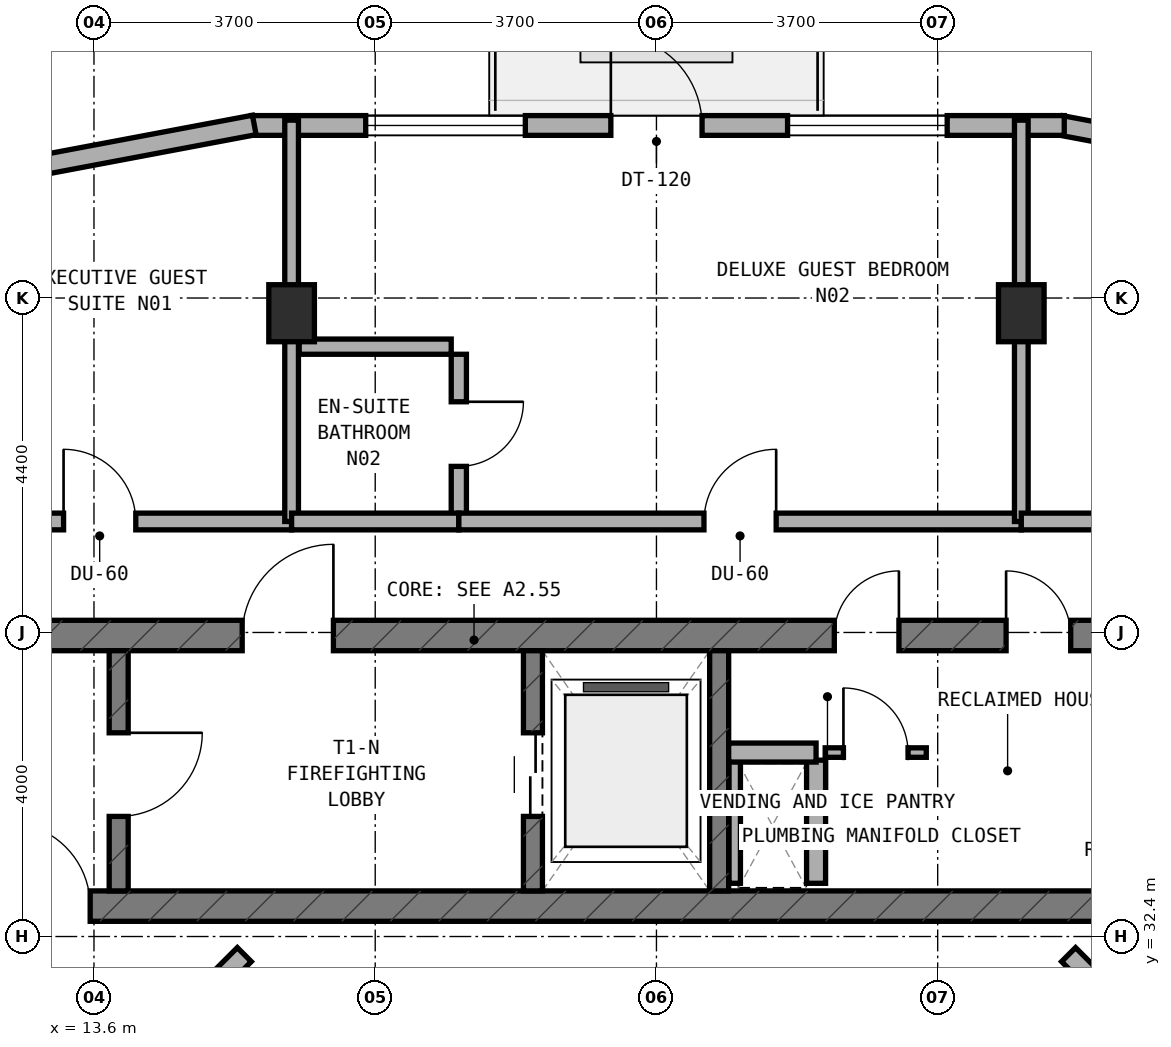
"""IFC4 building model, lengths in metres.
Left out: names, types, materials, properties, quantities, classifications, styles, units other than length and angle.
Written with IfcOpenShell. Run it as: python <this file> out.ifc"""

import sys

from ifc_helpers import new_model, si_unit, direction, frame, frame_2d, origin, origin_2d, place, context, subcontext, project, spatial, rectangle, extrude, element, fill, save


model = new_model("IFC4")
c1 = context("Model", 3, precision=1e-05, world=origin(), true_north=direction((0.0, 1.0)))
c2 = subcontext(c1, "Body", "Model", "MODEL_VIEW")
j1 = project(units=[si_unit("LENGTHUNIT", "METRE"), si_unit("PLANEANGLEUNIT", "RADIAN")], contexts=[c1])
p1 = place(None, origin())
s1 = spatial("IfcSite", under=j1, at=p1, CompositionType="ELEMENT")
p2 = place(p1, origin())
s2 = spatial("IfcBuilding", under=s1, at=p2, CompositionType="ELEMENT")
p3 = place(p2, frame((0.0, 0.0, 254.0)))
s3 = spatial("IfcBuildingStorey", under=s2, at=p3, CompositionType="ELEMENT", Elevation=254.0)
p4 = place(p3, frame((6.4, 32.8, 0.0), z_axis=(0.0, 0.0, 1.0), x_axis=(1.0, 0.0, 0.0)))
e1 = element("IfcWall", 1, at=p4, inside=s3, PredefinedType="SHEAR", context=c2, shape_type="SweptSolid", body=[
    extrude(rectangle(XDim=24.4, YDim=0.4, at=frame_2d((12.2, 0.0))), origin(), (0.0, 0.0, 1.0), 3.6),
])
p5 = place(p4, frame((6.05, 0.0, 0.0)))
e2 = element("IfcOpeningElement", 2, at=p5, cuts=e1, PredefinedType="OPENING", context=c2, shape_type="SweptSolid", body=[
    extrude(rectangle(XDim=1.1, YDim=2.15, at=frame_2d((0.55, 1.075))), frame((0.0, 0.21, 0.0), z_axis=(0.0, -1.0, 0.0), x_axis=(1.0, 0.0, 0.0)), (0.0, 0.0, 1.0), 0.42),
])
p6 = place(p3, frame((6.4, 36.36, 0.0), z_axis=(0.0, 0.0, 1.0), x_axis=(1.0, 0.0, 0.0)))
e3 = element("IfcWall", 3, at=p6, inside=s3, PredefinedType="SHEAR", context=c2, shape_type="SweptSolid", body=[
    extrude(rectangle(XDim=24.4, YDim=0.4, at=frame_2d((12.2, 0.0))), origin(), (0.0, 0.0, 1.0), 3.6),
])
p7 = place(p6, frame((9.15, 0.0, 0.0)))
e4 = element("IfcOpeningElement", 4, at=p7, cuts=e3, PredefinedType="OPENING", context=c2, shape_type="SweptSolid", body=[
    extrude(rectangle(XDim=1.2, YDim=2.15, at=frame_2d((0.6, 1.075))), frame((0.0, 0.21, 0.0), z_axis=(0.0, -1.0, 0.0), x_axis=(1.0, 0.0, 0.0)), (0.0, 0.0, 1.0), 0.42),
])
p8 = place(p6, frame((19.2, 0.0, 0.0)))
e5 = element("IfcOpeningElement", 5, at=p8, cuts=e3, PredefinedType="OPENING", context=c2, shape_type="SweptSolid", body=[
    extrude(rectangle(XDim=0.85, YDim=2.1, at=frame_2d((0.425, 1.05))), frame((0.0, 0.21, 0.0), z_axis=(0.0, -1.0, 0.0), x_axis=(1.0, 0.0, 0.0)), (0.0, 0.0, 1.0), 0.42),
])
p9 = place(p6, frame((16.94, 0.0, 0.0)))
e6 = element("IfcOpeningElement", 6, at=p9, cuts=e3, PredefinedType="OPENING", context=c2, shape_type="SweptSolid", body=[
    extrude(rectangle(XDim=0.85, YDim=2.1, at=frame_2d((0.425, 1.05))), frame((0.0, 0.21, 0.0), z_axis=(0.0, -1.0, 0.0), x_axis=(1.0, 0.0, 0.0)), (0.0, 0.0, 1.0), 0.42),
])
p10 = place(p3, frame((13.925, 33.0, 0.0), z_axis=(0.0, 0.0, 1.0), x_axis=(0.0, 1.0, 0.0)))
e7 = element("IfcWall", 7, at=p10, inside=s3, PredefinedType="STANDARD", context=c2, shape_type="SweptSolid", body=[
    extrude(rectangle(XDim=3.16, YDim=0.25, at=frame_2d((1.58, 0.0))), origin(), (0.0, 0.0, 1.0), 3.32),
])
p11 = place(p10, frame((0.98, 0.0, 0.0)))
e8 = element("IfcOpeningElement", 8, at=p11, cuts=e7, PredefinedType="OPENING", context=c2, shape_type="SweptSolid", body=[
    extrude(rectangle(XDim=1.1, YDim=2.15, at=frame_2d((0.55, 1.075))), frame((0.0, 0.135, 0.0), z_axis=(0.0, -1.0, 0.0), x_axis=(1.0, 0.0, 0.0)), (0.0, 0.0, 1.0), 0.27),
])
p12 = place(p3, frame((19.375, 33.0, 0.0), z_axis=(0.0, 0.0, 1.0), x_axis=(0.0, 1.0, 0.0)))
e9 = element("IfcWall", 9, at=p12, inside=s3, PredefinedType="STANDARD", context=c2, shape_type="SweptSolid", body=[
    extrude(rectangle(XDim=3.16, YDim=0.25, at=frame_2d((1.58, 0.0))), origin(), (0.0, 0.0, 1.0), 3.32),
])
p13 = place(p12, frame((0.98, 0.0, 0.0)))
e10 = element("IfcOpeningElement", 10, at=p13, cuts=e9, PredefinedType="OPENING", context=c2, shape_type="SweptSolid", body=[
    extrude(rectangle(XDim=1.1, YDim=2.15, at=frame_2d((0.55, 1.075))), frame((0.0, 0.135, 0.0), z_axis=(0.0, -1.0, 0.0), x_axis=(1.0, 0.0, 0.0)), (0.0, 0.0, 1.0), 0.27),
])
p14 = place(p3, frame((21.825, 33.0, 0.0), z_axis=(0.0, 0.0, 1.0), x_axis=(0.0, 1.0, 0.0)))
e11 = element("IfcWall", 11, at=p14, inside=s3, PredefinedType="STANDARD", context=c2, shape_type="SweptSolid", body=[
    extrude(rectangle(XDim=3.16, YDim=0.25, at=frame_2d((1.58, 0.0))), origin(), (0.0, 0.0, 1.0), 3.32),
])
for number, where, z_axis, x_axis in (
    (12, (16.2, 40.6, 0.0), (0.0, 0.0, 1.0), (1.0, 0.0, 0.0)),
    (13, (25.8, 40.6, 0.0), (0.0, 0.0, 1.0), (1.0, 0.0, 0.0)),
):
    element("IfcColumn", number, at=place(p3, frame(where, z_axis=z_axis, x_axis=x_axis)), inside=s3, PredefinedType="COLUMN", context=c2, shape_type="SweptSolid", body=[
        extrude(rectangle(XDim=0.6, YDim=0.75, at=origin_2d()), origin(), (0.0, 0.0, 1.0), 3.6),
    ])
p15 = place(p3, frame((34.284, 41.571, 0.0), z_axis=(0.0, 0.0, 1.0), x_axis=(-0.982717573718, 0.185111237656, 0.0)))
e14 = element("IfcWall", 14, at=p15, inside=s3, PredefinedType="STANDARD", context=c2, shape_type="SweptSolid", body=[
    extrude(rectangle(XDim=8.098, YDim=0.26, at=frame_2d((4.049, 0.0))), origin(), (0.0, 0.0, 1.0), 3.32),
])
p16 = place(p15, frame((2.999, 0.0, 0.85)))
e15 = element("IfcOpeningElement", 15, at=p16, cuts=e14, PredefinedType="OPENING", context=c2, shape_type="SweptSolid", body=[
    extrude(rectangle(XDim=2.1, YDim=1.5, at=frame_2d((1.05, 0.75))), frame((0.0, 0.14, 0.0), z_axis=(0.0, -1.0, 0.0), x_axis=(1.0, 0.0, 0.0)), (0.0, 0.0, 1.0), 0.28),
])
p17 = place(p3, frame((26.365, 43.07, 0.0), z_axis=(0.0, 0.0, 1.0), x_axis=(-1.0, 0.0, 0.0)))
e16 = element("IfcWall", 16, at=p17, inside=s3, PredefinedType="STANDARD", context=c2, shape_type="SweptSolid", body=[
    extrude(rectangle(XDim=10.695, YDim=0.26, at=frame_2d((5.348, 0.0))), origin(), (0.0, 0.0, 1.0), 3.32),
])
p18 = place(p17, frame((4.765, 0.0, 0.0)))
e17 = element("IfcOpeningElement", 17, at=p18, cuts=e16, PredefinedType="OPENING", context=c2, shape_type="SweptSolid", body=[
    extrude(rectangle(XDim=1.2, YDim=2.15, at=frame_2d((0.6, 1.075))), frame((0.0, 0.14, 0.0), z_axis=(0.0, -1.0, 0.0), x_axis=(1.0, 0.0, 0.0)), (0.0, 0.0, 1.0), 0.28),
])
p19 = place(p17, frame((1.54, 0.0, 0.85)))
e18 = element("IfcOpeningElement", 18, at=p19, cuts=e16, PredefinedType="OPENING", context=c2, shape_type="SweptSolid", body=[
    extrude(rectangle(XDim=2.1, YDim=1.5, at=frame_2d((1.05, 0.75))), frame((0.0, 0.14, 0.0), z_axis=(0.0, -1.0, 0.0), x_axis=(1.0, 0.0, 0.0)), (0.0, 0.0, 1.0), 0.28),
])
p20 = place(p17, frame((7.09, 0.0, 0.85)))
e19 = element("IfcOpeningElement", 19, at=p20, cuts=e16, PredefinedType="OPENING", context=c2, shape_type="SweptSolid", body=[
    extrude(rectangle(XDim=2.1, YDim=1.5, at=frame_2d((1.05, 0.75))), frame((0.0, 0.14, 0.0), z_axis=(0.0, -1.0, 0.0), x_axis=(1.0, 0.0, 0.0)), (0.0, 0.0, 1.0), 0.28),
])
p21 = place(p3, frame((15.709, 43.077, 0.0), z_axis=(0.0, 0.0, 1.0), x_axis=(-0.982711765767, -0.185142068214, 0.0)))
e20 = element("IfcWall", 20, at=p21, inside=s3, PredefinedType="STANDARD", context=c2, shape_type="SweptSolid", body=[
    extrude(rectangle(XDim=8.134, YDim=0.26, at=frame_2d((4.067, 0.0))), origin(), (0.0, 0.0, 1.0), 3.32),
])
p22 = place(p21, frame((3.017, 0.0, 0.85)))
e21 = element("IfcOpeningElement", 21, at=p22, cuts=e20, PredefinedType="OPENING", context=c2, shape_type="SweptSolid", body=[
    extrude(rectangle(XDim=2.1, YDim=1.5, at=frame_2d((1.05, 0.75))), frame((0.0, 0.14, 0.0), z_axis=(0.0, -1.0, 0.0), x_axis=(1.0, 0.0, 0.0)), (0.0, 0.0, 1.0), 0.28),
])
for number, where, z_axis, x_axis in (
    (22, (28.056, 30.528, 0.0), (0.0, 0.0, 1.0), (-0.707, 0.707, 0.0)),
    (23, (15.578, 32.162, 0.0), (0.0, 0.0, 1.0), (-0.707, -0.707, 0.0)),
):
    element("IfcWall", number, at=place(p3, frame(where, z_axis=z_axis, x_axis=x_axis)), inside=s3, PredefinedType="STANDARD", context=c2, shape_type="SweptSolid", body=[
        extrude(rectangle(XDim=2.311, YDim=0.26, at=frame_2d((1.155, 0.0))), origin(), (0.0, 0.0, 1.0), 3.32),
    ])
p23 = place(p3, frame((22.03, 33.1, 0.0), z_axis=(0.0, 0.0, 1.0), x_axis=(0.0, 1.0, 0.0)))
e24 = element("IfcWall", 24, at=p23, inside=s3, PredefinedType="PARTITIONING", context=c2, shape_type="SweptSolid", body=[
    extrude(rectangle(XDim=1.62, YDim=0.15, at=frame_2d((0.81, 0.0))), origin(), (0.0, 0.0, 1.0), 3.32),
])
p24 = place(p3, frame((23.1, 33.1, 0.0), z_axis=(0.0, 0.0, 1.0), x_axis=(0.0, 1.0, 0.0)))
e25 = element("IfcWall", 25, at=p24, inside=s3, PredefinedType="SOLIDWALL", context=c2, shape_type="SweptSolid", body=[
    extrude(rectangle(XDim=1.62, YDim=0.25, at=frame_2d((0.81, 0.0))), origin(), (0.0, 0.0, 1.0), 3.32),
])
p25 = place(p3, frame((21.95, 34.82, 0.0), z_axis=(0.0, 0.0, 1.0), x_axis=(1.0, 0.0, 0.0)))
e26 = element("IfcWall", 26, at=p25, inside=s3, PredefinedType="SOLIDWALL", context=c2, shape_type="SweptSolid", body=[
    extrude(rectangle(XDim=1.15, YDim=0.25, at=frame_2d((0.575, 0.0))), origin(), (0.0, 0.0, 1.0), 3.32),
])
p26 = place(p3, frame((23.22, 34.82, 0.0), z_axis=(0.0, 0.0, 1.0), x_axis=(1.0, 0.0, 0.0)))
e27 = element("IfcWall", 27, at=p26, inside=s3, PredefinedType="PARTITIONING", context=c2, shape_type="SweptSolid", body=[
    extrude(rectangle(XDim=1.33, YDim=0.125, at=frame_2d((0.665, 0.0))), origin(), (0.0, 0.0, 1.0), 3.32),
])
p27 = place(p26, frame((0.24, 0.0, 0.0)))
e28 = element("IfcOpeningElement", 28, at=p27, cuts=e27, PredefinedType="OPENING", context=c2, shape_type="SweptSolid", body=[
    extrude(rectangle(XDim=0.85, YDim=2.1, at=frame_2d((0.425, 1.05))), frame((0.0, 0.073, 0.0), z_axis=(0.0, -1.0, 0.0), x_axis=(1.0, 0.0, 0.0)), (0.0, 0.0, 1.0), 0.145),
])
p28 = place(p3, frame((11.15, 37.86, 0.0), z_axis=(0.0, 0.0, 1.0), x_axis=(1.0, 0.0, 0.0)))
e29 = element("IfcWall", 29, at=p28, inside=s3, PredefinedType="SOLIDWALL", context=c2, shape_type="SweptSolid", body=[
    extrude(rectangle(XDim=5.05, YDim=0.22, at=frame_2d((2.525, 0.0))), origin(), (0.0, 0.0, 1.0), 2.745),
])
p29 = place(p28, frame((2.05, 0.0, 0.0)))
e30 = element("IfcOpeningElement", 30, at=p29, cuts=e29, PredefinedType="OPENING", context=c2, shape_type="SweptSolid", body=[
    extrude(rectangle(XDim=0.95, YDim=2.1, at=frame_2d((0.475, 1.05))), frame((0.0, 0.12, 0.0), z_axis=(0.0, -1.0, 0.0), x_axis=(1.0, 0.0, 0.0)), (0.0, 0.0, 1.0), 0.24),
])
p30 = place(p3, frame((16.2, 37.86, 0.0), z_axis=(0.0, 0.0, 1.0), x_axis=(0.0, 1.0, 0.0)))
e31 = element("IfcWall", 31, at=p30, inside=s3, PredefinedType="SOLIDWALL", context=c2, shape_type="SweptSolid", body=[
    extrude(rectangle(XDim=5.28, YDim=0.18, at=frame_2d((2.64, 0.0))), origin(), (0.0, 0.0, 1.0), 2.745),
])
p31 = place(p3, frame((18.4, 37.96, 0.0), z_axis=(0.0, 0.0, 1.0), x_axis=(0.0, 1.0, 0.0)))
e32 = element("IfcWall", 32, at=p31, inside=s3, PredefinedType="PLUMBINGWALL", context=c2, shape_type="SweptSolid", body=[
    extrude(rectangle(XDim=2.1, YDim=0.2, at=frame_2d((1.05, 0.0))), origin(), (0.0, 0.0, 1.0), 2.845),
])
p32 = place(p31, frame((0.625, 0.0, 0.0)))
e33 = element("IfcOpeningElement", 33, at=p32, cuts=e32, PredefinedType="OPENING", context=c2, shape_type="SweptSolid", body=[
    extrude(rectangle(XDim=0.85, YDim=2.1, at=frame_2d((0.425, 1.05))), frame((0.0, 0.11, 0.0), z_axis=(0.0, -1.0, 0.0), x_axis=(1.0, 0.0, 0.0)), (0.0, 0.0, 1.0), 0.22),
])
p33 = place(p3, frame((16.3, 40.16, 0.0), z_axis=(0.0, 0.0, 1.0), x_axis=(1.0, 0.0, 0.0)))
e34 = element("IfcWall", 34, at=p33, inside=s3, PredefinedType="PLUMBINGWALL", context=c2, shape_type="SweptSolid", body=[
    extrude(rectangle(XDim=2.0, YDim=0.2, at=frame_2d((1.0, 0.0))), origin(), (0.0, 0.0, 1.0), 3.32),
])
p34 = place(p3, frame((16.2, 37.86, 0.0), z_axis=(0.0, 0.0, 1.0), x_axis=(1.0, 0.0, 0.0)))
e35 = element("IfcWall", 35, at=p34, inside=s3, PredefinedType="SOLIDWALL", context=c2, shape_type="SweptSolid", body=[
    extrude(rectangle(XDim=2.2, YDim=0.22, at=frame_2d((1.1, 0.0))), origin(), (0.0, 0.0, 1.0), 2.745),
])
p35 = place(p3, frame((18.4, 37.86, 0.0), z_axis=(0.0, 0.0, 1.0), x_axis=(1.0, 0.0, 0.0)))
e36 = element("IfcWall", 36, at=p35, inside=s3, PredefinedType="SOLIDWALL", context=c2, shape_type="SweptSolid", body=[
    extrude(rectangle(XDim=7.4, YDim=0.22, at=frame_2d((3.7, 0.0))), origin(), (0.0, 0.0, 1.0), 2.745),
])
p36 = place(p35, frame((3.225, 0.0, 0.0)))
e37 = element("IfcOpeningElement", 37, at=p36, cuts=e36, PredefinedType="OPENING", context=c2, shape_type="SweptSolid", body=[
    extrude(rectangle(XDim=0.95, YDim=2.1, at=frame_2d((0.475, 1.05))), frame((0.0, 0.12, 0.0), z_axis=(0.0, -1.0, 0.0), x_axis=(1.0, 0.0, 0.0)), (0.0, 0.0, 1.0), 0.24),
])
p37 = place(p3, frame((25.8, 37.86, 0.0), z_axis=(0.0, 0.0, 1.0), x_axis=(0.0, 1.0, 0.0)))
e38 = element("IfcWall", 38, at=p37, inside=s3, PredefinedType="SOLIDWALL", context=c2, shape_type="SweptSolid", body=[
    extrude(rectangle(XDim=5.28, YDim=0.18, at=frame_2d((2.64, 0.0))), origin(), (0.0, 0.0, 1.0), 2.745),
])
p38 = place(p3, frame((25.8, 37.86, 0.0), z_axis=(0.0, 0.0, 1.0), x_axis=(1.0, 0.0, 0.0)))
e39 = element("IfcWall", 39, at=p38, inside=s3, PredefinedType="SOLIDWALL", context=c2, shape_type="SweptSolid", body=[
    extrude(rectangle(XDim=5.05, YDim=0.22, at=frame_2d((2.525, 0.0))), origin(), (0.0, 0.0, 1.0), 2.745),
])
p39 = place(p38, frame((2.05, 0.0, 0.0)))
e40 = element("IfcOpeningElement", 40, at=p39, cuts=e39, PredefinedType="OPENING", context=c2, shape_type="SweptSolid", body=[
    extrude(rectangle(XDim=0.95, YDim=2.1, at=frame_2d((0.475, 1.05))), frame((0.0, 0.12, 0.0), z_axis=(0.0, -1.0, 0.0), x_axis=(1.0, 0.0, 0.0)), (0.0, 0.0, 1.0), 0.24),
])
p40 = place(p18, frame((1.2, 0.0, 0.0), z_axis=(0.0, 0.0, 1.0), x_axis=(-1.0, 0.0, 0.0)))
e41 = element("IfcDoor", 41, at=p40, inside=s3, OperationType="SINGLE_SWING_LEFT", PredefinedType="DOOR", context=c2, shape_type="SweptSolid", body=[
    extrude(rectangle(XDim=1.2, YDim=2.15, at=frame_2d((0.6, 1.075))), frame((0.0, 0.025, 0.0), z_axis=(0.0, -1.0, 0.0), x_axis=(1.0, 0.0, 0.0)), (0.0, 0.0, 1.0), 0.05),
])
fill(e17, e41)
p41 = place(p19, origin())
e42 = element("IfcWindow", 42, at=p41, inside=s3, PartitioningType="SINGLE_PANEL", PredefinedType="WINDOW", context=c2, shape_type="SweptSolid", body=[
    extrude(rectangle(XDim=2.1, YDim=1.5, at=frame_2d((1.05, 0.75))), frame((0.0, 0.03, 0.0), z_axis=(0.0, -1.0, 0.0), x_axis=(1.0, 0.0, 0.0)), (0.0, 0.0, 1.0), 0.06),
])
fill(e18, e42)
p42 = place(p20, origin())
e43 = element("IfcWindow", 43, at=p42, inside=s3, PartitioningType="SINGLE_PANEL", PredefinedType="WINDOW", context=c2, shape_type="SweptSolid", body=[
    extrude(rectangle(XDim=2.1, YDim=1.5, at=frame_2d((1.05, 0.75))), frame((0.0, 0.03, 0.0), z_axis=(0.0, -1.0, 0.0), x_axis=(1.0, 0.0, 0.0)), (0.0, 0.0, 1.0), 0.06),
])
fill(e19, e43)
p43 = place(p11, frame((1.1, 0.0, 0.0), z_axis=(0.0, 0.0, 1.0), x_axis=(-1.0, 0.0, 0.0)))
e44 = element("IfcDoor", 44, at=p43, inside=s3, OperationType="SINGLE_SWING_LEFT", PredefinedType="DOOR", context=c2, shape_type="SweptSolid", body=[
    extrude(rectangle(XDim=1.1, YDim=2.15, at=frame_2d((0.55, 1.075))), frame((0.0, 0.025, 0.0), z_axis=(0.0, -1.0, 0.0), x_axis=(1.0, 0.0, 0.0)), (0.0, 0.0, 1.0), 0.05),
])
fill(e8, e44)
p44 = place(p7, origin())
e45 = element("IfcDoor", 45, at=p44, inside=s3, OperationType="SINGLE_SWING_RIGHT", PredefinedType="DOOR", context=c2, shape_type="SweptSolid", body=[
    extrude(rectangle(XDim=1.2, YDim=2.15, at=frame_2d((0.6, 1.075))), frame((0.0, 0.025, 0.0), z_axis=(0.0, -1.0, 0.0), x_axis=(1.0, 0.0, 0.0)), (0.0, 0.0, 1.0), 0.05),
])
fill(e4, e45)
p45 = place(p13, origin())
e46 = element("IfcDoor", 46, at=p45, inside=s3, OperationType="DOUBLE_DOOR_SLIDING", PredefinedType="DOOR", context=c2, shape_type="SweptSolid", body=[
    extrude(rectangle(XDim=1.1, YDim=2.15, at=frame_2d((0.55, 1.075))), frame((0.0, 0.025, 0.0), z_axis=(0.0, -1.0, 0.0), x_axis=(1.0, 0.0, 0.0)), (0.0, 0.0, 1.0), 0.05),
])
fill(e10, e46)
p46 = place(p8, origin())
e47 = element("IfcDoor", 47, at=p46, inside=s3, OperationType="SINGLE_SWING_LEFT", PredefinedType="DOOR", context=c2, shape_type="SweptSolid", body=[
    extrude(rectangle(XDim=0.85, YDim=2.1, at=frame_2d((0.425, 1.05))), frame((0.0, 0.025, 0.0), z_axis=(0.0, -1.0, 0.0), x_axis=(1.0, 0.0, 0.0)), (0.0, 0.0, 1.0), 0.05),
])
fill(e5, e47)
p47 = place(p9, origin())
e48 = element("IfcDoor", 48, at=p47, inside=s3, OperationType="SINGLE_SWING_RIGHT", PredefinedType="DOOR", context=c2, shape_type="SweptSolid", body=[
    extrude(rectangle(XDim=0.85, YDim=2.1, at=frame_2d((0.425, 1.05))), frame((0.0, 0.025, 0.0), z_axis=(0.0, -1.0, 0.0), x_axis=(1.0, 0.0, 0.0)), (0.0, 0.0, 1.0), 0.05),
])
fill(e6, e48)
p48 = place(p5, origin())
e49 = element("IfcDoor", 49, at=p48, inside=s3, OperationType="SINGLE_SWING_LEFT", PredefinedType="DOOR", context=c2, shape_type="SweptSolid", body=[
    extrude(rectangle(XDim=1.1, YDim=2.15, at=frame_2d((0.55, 1.075))), frame((0.0, 0.025, 0.0), z_axis=(0.0, -1.0, 0.0), x_axis=(1.0, 0.0, 0.0)), (0.0, 0.0, 1.0), 0.05),
])
fill(e2, e49)
p49 = place(p27, origin())
e50 = element("IfcDoor", 50, at=p49, inside=s3, OperationType="SINGLE_SWING_LEFT", PredefinedType="DOOR", context=c2, shape_type="SweptSolid", body=[
    extrude(rectangle(XDim=0.85, YDim=2.1, at=frame_2d((0.425, 1.05))), frame((0.0, 0.025, 0.0), z_axis=(0.0, -1.0, 0.0), x_axis=(1.0, 0.0, 0.0)), (0.0, 0.0, 1.0), 0.05),
])
fill(e28, e50)
p50 = place(p29, origin())
e51 = element("IfcDoor", 51, at=p50, inside=s3, OperationType="SINGLE_SWING_LEFT", PredefinedType="DOOR", context=c2, shape_type="SweptSolid", body=[
    extrude(rectangle(XDim=0.95, YDim=2.1, at=frame_2d((0.475, 1.05))), frame((0.0, 0.025, 0.0), z_axis=(0.0, -1.0, 0.0), x_axis=(1.0, 0.0, 0.0)), (0.0, 0.0, 1.0), 0.05),
])
fill(e30, e51)
p51 = place(p32, frame((0.85, 0.0, 0.0), z_axis=(0.0, 0.0, 1.0), x_axis=(-1.0, 0.0, 0.0)))
e52 = element("IfcDoor", 52, at=p51, inside=s3, OperationType="SINGLE_SWING_LEFT", PredefinedType="DOOR", context=c2, shape_type="SweptSolid", body=[
    extrude(rectangle(XDim=0.85, YDim=2.1, at=frame_2d((0.425, 1.05))), frame((0.0, 0.025, 0.0), z_axis=(0.0, -1.0, 0.0), x_axis=(1.0, 0.0, 0.0)), (0.0, 0.0, 1.0), 0.05),
])
fill(e33, e52)
p52 = place(p36, origin())
e53 = element("IfcDoor", 53, at=p52, inside=s3, OperationType="SINGLE_SWING_RIGHT", PredefinedType="DOOR", context=c2, shape_type="SweptSolid", body=[
    extrude(rectangle(XDim=0.95, YDim=2.1, at=frame_2d((0.475, 1.05))), frame((0.0, 0.025, 0.0), z_axis=(0.0, -1.0, 0.0), x_axis=(1.0, 0.0, 0.0)), (0.0, 0.0, 1.0), 0.05),
])
fill(e37, e53)
save(model, sys.argv[1])
